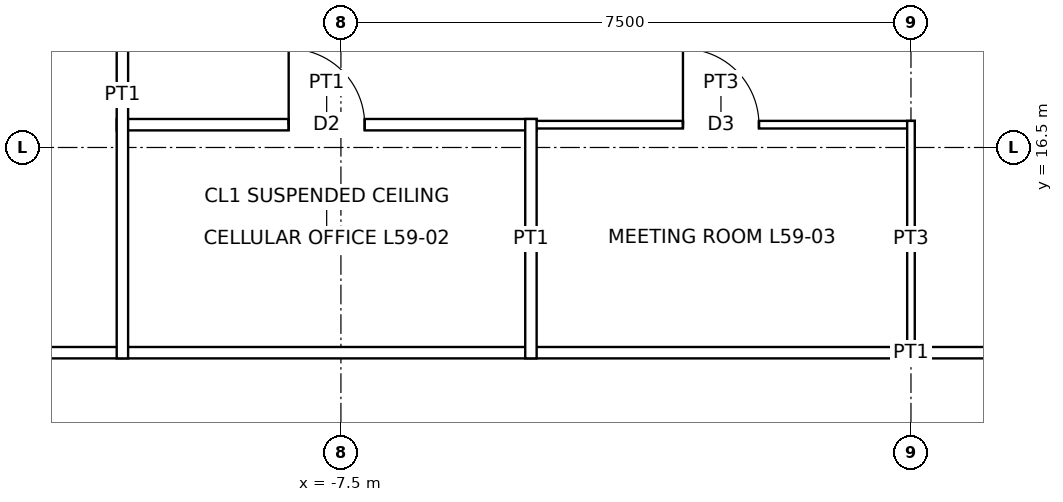
"""IFC4 building model, lengths in metres.
Left out: names, types, materials, properties, quantities, classifications, styles, units other than length and angle.
Written with IfcOpenShell. Run it as: python <this file> out.ifc"""

import sys

from ifc_helpers import new_model, si_unit, direction, frame, frame_2d, origin, place, context, subcontext, project, spatial, rectangle, extrude, element, fill, save


model = new_model("IFC4")
c1 = context("Model", 3, precision=1e-05, world=origin(), true_north=direction((0.0, 1.0)))
c2 = subcontext(c1, "Body", "Model", "MODEL_VIEW")
j1 = project(units=[si_unit("LENGTHUNIT", "METRE"), si_unit("PLANEANGLEUNIT", "RADIAN")], contexts=[c1])
p1 = place(None, origin())
s1 = spatial("IfcSite", under=j1, at=p1, CompositionType="ELEMENT")
p2 = place(p1, origin())
s2 = spatial("IfcBuilding", under=s1, at=p2, CompositionType="ELEMENT")
p3 = place(p2, frame((0.0, 0.0, 271.9)))
s3 = spatial("IfcBuildingStorey", under=s2, at=p3, CompositionType="ELEMENT", Elevation=271.9)
p4 = place(p3, frame((-13.875, 13.8, 0.0), z_axis=(0.0, 0.0, 1.0), x_axis=(1.0, 0.0, 0.0)))
e1 = element("IfcWall", 1, at=p4, inside=s3, PredefinedType="PARTITIONING", context=c2, shape_type="SweptSolid", body=[
    extrude(rectangle(XDim=27.75, YDim=0.15, at=frame_2d((13.875, 0.0))), origin(), (0.0, 0.0, 1.0), 3.85),
])
p5 = place(p4, frame((20.275, 0.0, 0.0)))
e2 = element("IfcOpeningElement", 2, at=p5, cuts=e1, PredefinedType="OPENING", context=c2, shape_type="SweptSolid", body=[
    extrude(rectangle(XDim=1.0, YDim=2.4, at=frame_2d((0.5, 1.2))), frame((0.0, 0.085, 0.0), z_axis=(0.0, -1.0, 0.0), x_axis=(1.0, 0.0, 0.0)), (0.0, 0.0, 1.0), 0.17),
])
p6 = place(p3, frame((-10.45, 16.8, 0.0), z_axis=(0.0, 0.0, 1.0), x_axis=(1.0, 0.0, 0.0)))
e3 = element("IfcWall", 3, at=p6, inside=s3, PredefinedType="PARTITIONING", context=c2, shape_type="SweptSolid", body=[
    extrude(rectangle(XDim=5.525, YDim=0.15, at=frame_2d((2.762, 0.0))), origin(), (0.0, 0.0, 1.0), 3.85),
])
p7 = place(p6, frame((2.262, 0.0, 0.0)))
e4 = element("IfcOpeningElement", 4, at=p7, cuts=e3, PredefinedType="OPENING", context=c2, shape_type="SweptSolid", body=[
    extrude(rectangle(XDim=1.0, YDim=2.1, at=frame_2d((0.5, 1.05))), frame((0.0, 0.085, 0.0), z_axis=(0.0, -1.0, 0.0), x_axis=(1.0, 0.0, 0.0)), (0.0, 0.0, 1.0), 0.17),
])
p8 = place(p3, frame((-5.05, 16.8, 0.0), z_axis=(0.0, 0.0, 1.0), x_axis=(1.0, 0.0, 0.0)))
e5 = element("IfcWall", 5, at=p8, inside=s3, PredefinedType="PARTITIONING", context=c2, shape_type="SweptSolid", body=[
    extrude(rectangle(XDim=5.1, YDim=0.1, at=frame_2d((2.55, 0.0))), origin(), (0.0, 0.0, 1.0), 3.85),
])
p9 = place(p8, frame((2.05, 0.0, 0.0)))
e6 = element("IfcOpeningElement", 6, at=p9, cuts=e5, PredefinedType="OPENING", context=c2, shape_type="SweptSolid", body=[
    extrude(rectangle(XDim=1.0, YDim=2.1, at=frame_2d((0.5, 1.05))), frame((0.0, 0.06, 0.0), z_axis=(0.0, -1.0, 0.0), x_axis=(1.0, 0.0, 0.0)), (0.0, 0.0, 1.0), 0.12),
])
p10 = place(p3, frame((-10.375, 13.725, 0.0), z_axis=(0.0, 0.0, 1.0), x_axis=(0.0, 1.0, 0.0)))
e7 = element("IfcWall", 7, at=p10, inside=s3, PredefinedType="PARTITIONING", context=c2, shape_type="SweptSolid", body=[
    extrude(rectangle(XDim=6.925, YDim=0.15, at=frame_2d((3.462, 0.0))), origin(), (0.0, 0.0, 1.0), 3.85),
])
p11 = place(p3, frame((-5.0, 13.725, 0.0), z_axis=(0.0, 0.0, 1.0), x_axis=(0.0, 1.0, 0.0)))
e8 = element("IfcWall", 8, at=p11, inside=s3, PredefinedType="PARTITIONING", context=c2, shape_type="SweptSolid", body=[
    extrude(rectangle(XDim=3.15, YDim=0.15, at=frame_2d((1.575, 0.0))), origin(), (0.0, 0.0, 1.0), 3.85),
])
p12 = place(p3, frame((0.0, 13.75, 0.0), z_axis=(0.0, 0.0, 1.0), x_axis=(0.0, 1.0, 0.0)))
e9 = element("IfcWall", 9, at=p12, inside=s3, PredefinedType="PARTITIONING", context=c2, shape_type="SweptSolid", body=[
    extrude(rectangle(XDim=3.1, YDim=0.1, at=frame_2d((1.55, 0.0))), origin(), (0.0, 0.0, 1.0), 3.243),
])
p13 = place(p7, origin())
e10 = element("IfcDoor", 10, at=p13, inside=s3, OperationType="SINGLE_SWING_LEFT", PredefinedType="DOOR", context=c2, shape_type="SweptSolid", body=[
    extrude(rectangle(XDim=1.0, YDim=2.1, at=frame_2d((0.5, 1.05))), frame((0.0, 0.025, 0.0), z_axis=(0.0, -1.0, 0.0), x_axis=(1.0, 0.0, 0.0)), (0.0, 0.0, 1.0), 0.05),
])
fill(e4, e10)
p14 = place(p9, origin())
e11 = element("IfcDoor", 11, at=p14, inside=s3, OperationType="SINGLE_SWING_LEFT", PredefinedType="DOOR", context=c2, shape_type="SweptSolid", body=[
    extrude(rectangle(XDim=1.0, YDim=2.1, at=frame_2d((0.5, 1.05))), frame((0.0, 0.025, 0.0), z_axis=(0.0, -1.0, 0.0), x_axis=(1.0, 0.0, 0.0)), (0.0, 0.0, 1.0), 0.05),
])
fill(e6, e11)
save(model, sys.argv[1])
